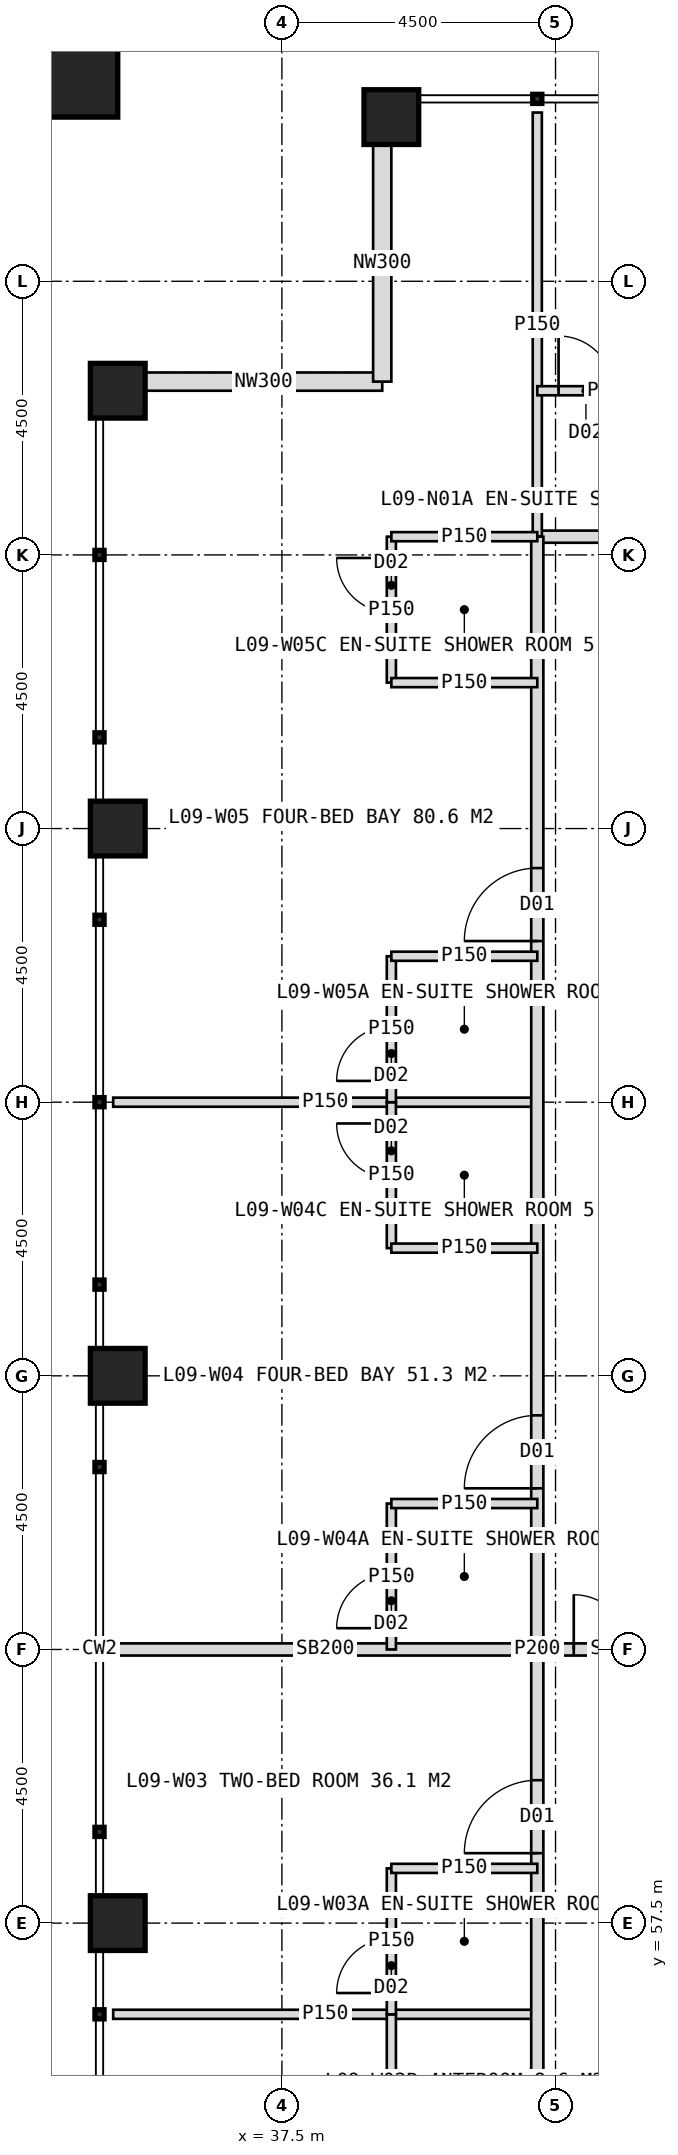
"""IFC4 building model, lengths in metres.
Left out: names, types, materials, properties, quantities, classifications, styles, units other than length and angle.
Written with IfcOpenShell. Run it as: python <this file> out.ifc"""

import sys

from ifc_helpers import new_model, si_unit, direction, frame, frame_2d, origin, origin_2d, place, context, subcontext, project, spatial, rectangle, hollow_rectangle, extrude, element, fill, save


model = new_model("IFC4")
c1 = context("Model", 3, precision=1e-05, world=origin(), true_north=direction((0.0, 1.0)))
c2 = subcontext(c1, "Body", "Model", "MODEL_VIEW")
j1 = project(units=[si_unit("LENGTHUNIT", "METRE"), si_unit("PLANEANGLEUNIT", "RADIAN")], contexts=[c1])
p1 = place(None, origin())
s1 = spatial("IfcSite", under=j1, at=p1, CompositionType="ELEMENT")
p2 = place(p1, origin())
s2 = spatial("IfcBuilding", under=s1, at=p2, CompositionType="ELEMENT")
p3 = place(p2, frame((0.0, 0.0, 43.0)))
s3 = spatial("IfcBuildingStorey", under=s2, at=p3, CompositionType="ELEMENT", Elevation=43.0)
for number, where, z_axis, x_axis in (
    (1, (39.3, 87.2, 0.0), (0.0, 0.0, 1.0), (1.0, 0.0, 0.0)),
    (2, (34.8, 57.5, 0.0), (0.0, 0.0, 1.0), (1.0, 0.0, 0.0)),
    (3, (34.8, 66.5, 0.0), (0.0, 0.0, 1.0), (1.0, 0.0, 0.0)),
    (4, (34.8, 75.5, 0.0), (0.0, 0.0, 1.0), (1.0, 0.0, 0.0)),
    (5, (34.8, 82.7, 0.0), (0.0, 0.0, 1.0), (1.0, 0.0, 0.0)),
):
    element("IfcColumn", number, at=place(p3, frame(where, z_axis=z_axis, x_axis=x_axis)), inside=s3, PredefinedType="COLUMN", context=c2, shape_type="SweptSolid", body=[
        extrude(hollow_rectangle(XDim=0.9, YDim=0.9, WallThickness=0.08, at=origin_2d()), origin(), (0.0, 0.0, 1.0), 4.0),
    ])
p4 = place(p3, frame((33.9, 88.1, 0.0), z_axis=(0.0, 0.0, 1.0), x_axis=(1.0, 0.0, 0.0)))
e6 = element("IfcColumn", 6, at=p4, inside=s3, PredefinedType="COLUMN", context=c2, shape_type="SweptSolid", body=[
    extrude(hollow_rectangle(XDim=1.8, YDim=1.8, WallThickness=0.1, at=origin_2d()), origin(), (0.0, 0.0, 1.0), 4.0),
])
for number, where, z_axis, x_axis in (
    (7, (35.25, 82.85, 0.0), (0.0, 0.0, 1.0), (1.0, 0.0, 0.0)),
    (8, (39.15, 82.85, 0.0), (0.0, 0.0, 1.0), (0.0, 1.0, 0.0)),
):
    element("IfcWall", number, at=place(p3, frame(where, z_axis=z_axis, x_axis=x_axis)), inside=s3, PredefinedType="ELEMENTEDWALL", context=c2, shape_type="SweptSolid", body=[
        extrude(rectangle(XDim=3.9, YDim=0.3, at=frame_2d((1.95, 0.0))), origin(), (0.0, 0.0, 1.0), 2.95),
    ])
p5 = place(p3, frame((41.7, 80.3, 0.0), z_axis=(0.0, 0.0, 1.0), x_axis=(1.0, 0.0, 0.0)))
e9 = element("IfcWall", 9, at=p5, inside=s3, PredefinedType="PARTITIONING", context=c2, shape_type="SweptSolid", body=[
    extrude(rectangle(XDim=36.6, YDim=0.2, at=frame_2d((18.3, 0.0))), origin(), (0.0, 0.0, 1.0), 3.75),
])
p6 = place(p5, frame((2.65, 0.0, 0.0)))
e10 = element("IfcOpeningElement", 10, at=p6, cuts=e9, PredefinedType="OPENING", context=c2, shape_type="SweptSolid", body=[
    extrude(rectangle(XDim=1.2, YDim=2.2, at=frame_2d((0.6, 1.1))), frame((0.0, 0.11, 0.0), z_axis=(0.0, -1.0, 0.0), x_axis=(1.0, 0.0, 0.0)), (0.0, 0.0, 1.0), 0.22),
])
p7 = place(p5, frame((11.95, 0.0, 0.0)))
e11 = element("IfcOpeningElement", 11, at=p7, cuts=e9, PredefinedType="OPENING", context=c2, shape_type="SweptSolid", body=[
    extrude(rectangle(XDim=1.2, YDim=2.2, at=frame_2d((0.6, 1.1))), frame((0.0, 0.11, 0.0), z_axis=(0.0, -1.0, 0.0), x_axis=(1.0, 0.0, 0.0)), (0.0, 0.0, 1.0), 0.22),
])
p8 = place(p5, frame((20.8, 0.0, 0.0)))
e12 = element("IfcOpeningElement", 12, at=p8, cuts=e9, PredefinedType="OPENING", context=c2, shape_type="SweptSolid", body=[
    extrude(rectangle(XDim=1.0, YDim=2.1, at=frame_2d((0.5, 1.05))), frame((0.0, 0.11, 0.0), z_axis=(0.0, -1.0, 0.0), x_axis=(1.0, 0.0, 0.0)), (0.0, 0.0, 1.0), 0.22),
])
p9 = place(p5, frame((26.95, 0.0, 0.0)))
e13 = element("IfcOpeningElement", 13, at=p9, cuts=e9, PredefinedType="OPENING", context=c2, shape_type="SweptSolid", body=[
    extrude(rectangle(XDim=1.2, YDim=2.2, at=frame_2d((0.6, 1.1))), frame((0.0, 0.11, 0.0), z_axis=(0.0, -1.0, 0.0), x_axis=(1.0, 0.0, 0.0)), (0.0, 0.0, 1.0), 0.22),
])
p10 = place(p3, frame((41.7, 80.3, 0.0), z_axis=(0.0, 0.0, 1.0), x_axis=(0.0, 1.0, 0.0)))
e14 = element("IfcWall", 14, at=p10, inside=s3, PredefinedType="PARTITIONING", context=c2, shape_type="SweptSolid", body=[
    extrude(rectangle(XDim=6.975, YDim=0.15, at=frame_2d((3.487, 0.0))), origin(), (0.0, 0.0, 1.0), 3.75),
])
p11 = place(p3, frame((41.7, 82.7, 0.0), z_axis=(0.0, 0.0, 1.0), x_axis=(1.0, 0.0, 0.0)))
e15 = element("IfcWall", 15, at=p11, inside=s3, PredefinedType="PARTITIONING", context=c2, shape_type="SweptSolid", body=[
    extrude(rectangle(XDim=2.4, YDim=0.15, at=frame_2d((1.2, 0.0))), origin(), (0.0, 0.0, 1.0), 2.95),
])
p12 = place(p11, frame((0.35, 0.0, 0.0)))
e16 = element("IfcOpeningElement", 16, at=p12, cuts=e15, PredefinedType="OPENING", context=c2, shape_type="SweptSolid", body=[
    extrude(rectangle(XDim=0.9, YDim=2.1, at=frame_2d((0.45, 1.05))), frame((0.0, 0.085, 0.0), z_axis=(0.0, -1.0, 0.0), x_axis=(1.0, 0.0, 0.0)), (0.0, 0.0, 1.0), 0.17),
])
p13 = place(p3, frame((41.7, 56.0, 0.0), z_axis=(0.0, 0.0, 1.0), x_axis=(-1.0, 0.0, 0.0)))
e17 = element("IfcWall", 17, at=p13, inside=s3, PredefinedType="PARTITIONING", context=c2, shape_type="SweptSolid", body=[
    extrude(rectangle(XDim=6.975, YDim=0.15, at=frame_2d((3.487, 0.0))), origin(), (0.0, 0.0, 1.0), 3.75),
])
p14 = place(p3, frame((41.7, 62.0, 0.0), z_axis=(0.0, 0.0, 1.0), x_axis=(-1.0, 0.0, 0.0)))
e18 = element("IfcWall", 18, at=p14, inside=s3, PredefinedType="SOLIDWALL", context=c2, shape_type="SweptSolid", body=[
    extrude(rectangle(XDim=6.975, YDim=0.2, at=frame_2d((3.487, 0.0))), origin(), (0.0, 0.0, 1.0), 2.75),
])
p15 = place(p3, frame((41.7, 71.0, 0.0), z_axis=(0.0, 0.0, 1.0), x_axis=(-1.0, 0.0, 0.0)))
e19 = element("IfcWall", 19, at=p15, inside=s3, PredefinedType="PARTITIONING", context=c2, shape_type="SweptSolid", body=[
    extrude(rectangle(XDim=6.975, YDim=0.15, at=frame_2d((3.487, 0.0))), origin(), (0.0, 0.0, 1.0), 3.75),
])
p16 = place(p3, frame((41.7, 43.7, 0.0), z_axis=(0.0, 0.0, 1.0), x_axis=(0.0, 1.0, 0.0)))
e20 = element("IfcWall", 20, at=p16, inside=s3, PredefinedType="PARTITIONING", context=c2, shape_type="SweptSolid", body=[
    extrude(rectangle(XDim=36.6, YDim=0.2, at=frame_2d((18.3, 0.0))), origin(), (0.0, 0.0, 1.0), 3.75),
])
p17 = place(p16, frame((2.65, 0.0, 0.0)))
e21 = element("IfcOpeningElement", 21, at=p17, cuts=e20, PredefinedType="OPENING", context=c2, shape_type="SweptSolid", body=[
    extrude(rectangle(XDim=1.2, YDim=2.2, at=frame_2d((0.6, 1.1))), frame((0.0, 0.11, 0.0), z_axis=(0.0, -1.0, 0.0), x_axis=(1.0, 0.0, 0.0)), (0.0, 0.0, 1.0), 0.22),
])
p18 = place(p16, frame((8.95, 0.0, 0.0)))
e22 = element("IfcOpeningElement", 22, at=p18, cuts=e20, PredefinedType="OPENING", context=c2, shape_type="SweptSolid", body=[
    extrude(rectangle(XDim=1.2, YDim=2.2, at=frame_2d((0.6, 1.1))), frame((0.0, 0.11, 0.0), z_axis=(0.0, -1.0, 0.0), x_axis=(1.0, 0.0, 0.0)), (0.0, 0.0, 1.0), 0.22),
])
p19 = place(p16, frame((14.95, 0.0, 0.0)))
e23 = element("IfcOpeningElement", 23, at=p19, cuts=e20, PredefinedType="OPENING", context=c2, shape_type="SweptSolid", body=[
    extrude(rectangle(XDim=1.2, YDim=2.2, at=frame_2d((0.6, 1.1))), frame((0.0, 0.11, 0.0), z_axis=(0.0, -1.0, 0.0), x_axis=(1.0, 0.0, 0.0)), (0.0, 0.0, 1.0), 0.22),
])
p20 = place(p16, frame((20.95, 0.0, 0.0)))
e24 = element("IfcOpeningElement", 24, at=p20, cuts=e20, PredefinedType="OPENING", context=c2, shape_type="SweptSolid", body=[
    extrude(rectangle(XDim=1.2, YDim=2.2, at=frame_2d((0.6, 1.1))), frame((0.0, 0.11, 0.0), z_axis=(0.0, -1.0, 0.0), x_axis=(1.0, 0.0, 0.0)), (0.0, 0.0, 1.0), 0.22),
])
p21 = place(p16, frame((29.95, 0.0, 0.0)))
e25 = element("IfcOpeningElement", 25, at=p21, cuts=e20, PredefinedType="OPENING", context=c2, shape_type="SweptSolid", body=[
    extrude(rectangle(XDim=1.2, YDim=2.2, at=frame_2d((0.6, 1.1))), frame((0.0, 0.11, 0.0), z_axis=(0.0, -1.0, 0.0), x_axis=(1.0, 0.0, 0.0)), (0.0, 0.0, 1.0), 0.22),
])
p22 = place(p3, frame((39.3, 52.4, 0.0), z_axis=(0.0, 0.0, 1.0), x_axis=(0.0, 1.0, 0.0)))
e26 = element("IfcWall", 26, at=p22, inside=s3, PredefinedType="PARTITIONING", context=c2, shape_type="SweptSolid", body=[
    extrude(rectangle(XDim=3.6, YDim=0.15, at=frame_2d((1.8, 0.0))), origin(), (0.0, 0.0, 1.0), 3.75),
])
p23 = place(p22, frame((0.25, 0.0, 0.0)))
e27 = element("IfcOpeningElement", 27, at=p23, cuts=e26, PredefinedType="OPENING", context=c2, shape_type="SweptSolid", body=[
    extrude(rectangle(XDim=1.2, YDim=2.2, at=frame_2d((0.6, 1.1))), frame((0.0, 0.085, 0.0), z_axis=(0.0, -1.0, 0.0), x_axis=(1.0, 0.0, 0.0)), (0.0, 0.0, 1.0), 0.17),
])
p24 = place(p3, frame((39.3, 56.0, 0.0), z_axis=(0.0, 0.0, 1.0), x_axis=(0.0, 1.0, 0.0)))
e28 = element("IfcWall", 28, at=p24, inside=s3, PredefinedType="PARTITIONING", context=c2, shape_type="SweptSolid", body=[
    extrude(rectangle(XDim=2.4, YDim=0.15, at=frame_2d((1.2, 0.0))), origin(), (0.0, 0.0, 1.0), 3.75),
])
p25 = place(p24, frame((0.35, 0.0, 0.0)))
e29 = element("IfcOpeningElement", 29, at=p25, cuts=e28, PredefinedType="OPENING", context=c2, shape_type="SweptSolid", body=[
    extrude(rectangle(XDim=0.9, YDim=2.1, at=frame_2d((0.45, 1.05))), frame((0.0, 0.085, 0.0), z_axis=(0.0, -1.0, 0.0), x_axis=(1.0, 0.0, 0.0)), (0.0, 0.0, 1.0), 0.17),
])
p26 = place(p3, frame((41.7, 58.4, 0.0), z_axis=(0.0, 0.0, 1.0), x_axis=(-1.0, 0.0, 0.0)))
e30 = element("IfcWall", 30, at=p26, inside=s3, PredefinedType="PARTITIONING", context=c2, shape_type="SweptSolid", body=[
    extrude(rectangle(XDim=2.4, YDim=0.15, at=frame_2d((1.2, 0.0))), origin(), (0.0, 0.0, 1.0), 3.75),
])
p27 = place(p3, frame((39.3, 62.0, 0.0), z_axis=(0.0, 0.0, 1.0), x_axis=(0.0, 1.0, 0.0)))
e31 = element("IfcWall", 31, at=p27, inside=s3, PredefinedType="PARTITIONING", context=c2, shape_type="SweptSolid", body=[
    extrude(rectangle(XDim=2.4, YDim=0.15, at=frame_2d((1.2, 0.0))), origin(), (0.0, 0.0, 1.0), 3.75),
])
p28 = place(p27, frame((0.35, 0.0, 0.0)))
e32 = element("IfcOpeningElement", 32, at=p28, cuts=e31, PredefinedType="OPENING", context=c2, shape_type="SweptSolid", body=[
    extrude(rectangle(XDim=0.9, YDim=2.1, at=frame_2d((0.45, 1.05))), frame((0.0, 0.085, 0.0), z_axis=(0.0, -1.0, 0.0), x_axis=(1.0, 0.0, 0.0)), (0.0, 0.0, 1.0), 0.17),
])
p29 = place(p3, frame((41.7, 64.4, 0.0), z_axis=(0.0, 0.0, 1.0), x_axis=(-1.0, 0.0, 0.0)))
e33 = element("IfcWall", 33, at=p29, inside=s3, PredefinedType="PARTITIONING", context=c2, shape_type="SweptSolid", body=[
    extrude(rectangle(XDim=2.4, YDim=0.15, at=frame_2d((1.2, 0.0))), origin(), (0.0, 0.0, 1.0), 3.75),
])
p30 = place(p3, frame((39.3, 68.6, 0.0), z_axis=(0.0, 0.0, 1.0), x_axis=(0.0, 1.0, 0.0)))
e34 = element("IfcWall", 34, at=p30, inside=s3, PredefinedType="PARTITIONING", context=c2, shape_type="SweptSolid", body=[
    extrude(rectangle(XDim=2.4, YDim=0.15, at=frame_2d((1.2, 0.0))), origin(), (0.0, 0.0, 1.0), 3.75),
])
p31 = place(p30, frame((1.15, 0.0, 0.0)))
e35 = element("IfcOpeningElement", 35, at=p31, cuts=e34, PredefinedType="OPENING", context=c2, shape_type="SweptSolid", body=[
    extrude(rectangle(XDim=0.9, YDim=2.1, at=frame_2d((0.45, 1.05))), frame((0.0, 0.085, 0.0), z_axis=(0.0, -1.0, 0.0), x_axis=(1.0, 0.0, 0.0)), (0.0, 0.0, 1.0), 0.17),
])
p32 = place(p3, frame((41.7, 68.6, 0.0), z_axis=(0.0, 0.0, 1.0), x_axis=(-1.0, 0.0, 0.0)))
e36 = element("IfcWall", 36, at=p32, inside=s3, PredefinedType="PARTITIONING", context=c2, shape_type="SweptSolid", body=[
    extrude(rectangle(XDim=2.4, YDim=0.15, at=frame_2d((1.2, 0.0))), origin(), (0.0, 0.0, 1.0), 3.75),
])
p33 = place(p3, frame((39.3, 71.0, 0.0), z_axis=(0.0, 0.0, 1.0), x_axis=(0.0, 1.0, 0.0)))
e37 = element("IfcWall", 37, at=p33, inside=s3, PredefinedType="PARTITIONING", context=c2, shape_type="SweptSolid", body=[
    extrude(rectangle(XDim=2.4, YDim=0.15, at=frame_2d((1.2, 0.0))), origin(), (0.0, 0.0, 1.0), 3.75),
])
p34 = place(p33, frame((0.35, 0.0, 0.0)))
e38 = element("IfcOpeningElement", 38, at=p34, cuts=e37, PredefinedType="OPENING", context=c2, shape_type="SweptSolid", body=[
    extrude(rectangle(XDim=0.9, YDim=2.1, at=frame_2d((0.45, 1.05))), frame((0.0, 0.085, 0.0), z_axis=(0.0, -1.0, 0.0), x_axis=(1.0, 0.0, 0.0)), (0.0, 0.0, 1.0), 0.17),
])
p35 = place(p3, frame((41.7, 73.4, 0.0), z_axis=(0.0, 0.0, 1.0), x_axis=(-1.0, 0.0, 0.0)))
e39 = element("IfcWall", 39, at=p35, inside=s3, PredefinedType="PARTITIONING", context=c2, shape_type="SweptSolid", body=[
    extrude(rectangle(XDim=2.4, YDim=0.15, at=frame_2d((1.2, 0.0))), origin(), (0.0, 0.0, 1.0), 3.75),
])
p36 = place(p3, frame((39.3, 77.9, 0.0), z_axis=(0.0, 0.0, 1.0), x_axis=(0.0, 1.0, 0.0)))
e40 = element("IfcWall", 40, at=p36, inside=s3, PredefinedType="PARTITIONING", context=c2, shape_type="SweptSolid", body=[
    extrude(rectangle(XDim=2.4, YDim=0.15, at=frame_2d((1.2, 0.0))), origin(), (0.0, 0.0, 1.0), 2.95),
])
p37 = place(p36, frame((1.15, 0.0, 0.0)))
e41 = element("IfcOpeningElement", 41, at=p37, cuts=e40, PredefinedType="OPENING", context=c2, shape_type="SweptSolid", body=[
    extrude(rectangle(XDim=0.9, YDim=2.1, at=frame_2d((0.45, 1.05))), frame((0.0, 0.085, 0.0), z_axis=(0.0, -1.0, 0.0), x_axis=(1.0, 0.0, 0.0)), (0.0, 0.0, 1.0), 0.17),
])
for number, where, z_axis, x_axis in (
    (42, (41.7, 77.9, 0.0), (0.0, 0.0, 1.0), (-1.0, 0.0, 0.0)),
    (43, (41.7, 80.3, 0.0), (0.0, 0.0, 1.0), (-1.0, 0.0, 0.0)),
):
    element("IfcWall", number, at=place(p3, frame(where, z_axis=z_axis, x_axis=x_axis)), inside=s3, PredefinedType="PARTITIONING", context=c2, shape_type="SweptSolid", body=[
        extrude(rectangle(XDim=2.4, YDim=0.15, at=frame_2d((1.2, 0.0))), origin(), (0.0, 0.0, 1.0), 3.75),
    ])
p38 = place(p3, frame((44.4, 62.0, 0.0), z_axis=(0.0, 0.0, 1.0), x_axis=(-1.0, 0.0, 0.0)))
e44 = element("IfcWall", 44, at=p38, inside=s3, PredefinedType="SOLIDWALL", context=c2, shape_type="SweptSolid", body=[
    extrude(rectangle(XDim=2.7, YDim=0.2, at=frame_2d((1.35, 0.0))), origin(), (0.0, 0.0, 1.0), 2.75),
])
p39 = place(p38, frame((0.3, 0.0, 0.0)))
e45 = element("IfcOpeningElement", 45, at=p39, cuts=e44, PredefinedType="OPENING", context=c2, shape_type="SweptSolid", body=[
    extrude(rectangle(XDim=1.8, YDim=2.2, at=frame_2d((0.9, 1.1))), frame((0.0, 0.11, 0.0), z_axis=(0.0, -1.0, 0.0), x_axis=(1.0, 0.0, 0.0)), (0.0, 0.0, 1.0), 0.22),
])
p40 = place(p12, origin())
e46 = element("IfcDoor", 46, at=p40, inside=s3, OperationType="SINGLE_SWING_LEFT", PredefinedType="DOOR", context=c2, shape_type="SweptSolid", body=[
    extrude(rectangle(XDim=0.9, YDim=2.1, at=frame_2d((0.45, 1.05))), frame((0.0, 0.025, 0.0), z_axis=(0.0, -1.0, 0.0), x_axis=(1.0, 0.0, 0.0)), (0.0, 0.0, 1.0), 0.05),
])
fill(e16, e46)
p41 = place(p19, origin())
e47 = element("IfcDoor", 47, at=p41, inside=s3, OperationType="SINGLE_SWING_LEFT", PredefinedType="DOOR", context=c2, shape_type="SweptSolid", body=[
    extrude(rectangle(XDim=1.2, YDim=2.2, at=frame_2d((0.6, 1.1))), frame((0.0, 0.025, 0.0), z_axis=(0.0, -1.0, 0.0), x_axis=(1.0, 0.0, 0.0)), (0.0, 0.0, 1.0), 0.05),
])
fill(e23, e47)
p42 = place(p25, origin())
e48 = element("IfcDoor", 48, at=p42, inside=s3, OperationType="SINGLE_SWING_LEFT", PredefinedType="DOOR", context=c2, shape_type="SweptSolid", body=[
    extrude(rectangle(XDim=0.9, YDim=2.1, at=frame_2d((0.45, 1.05))), frame((0.0, 0.025, 0.0), z_axis=(0.0, -1.0, 0.0), x_axis=(1.0, 0.0, 0.0)), (0.0, 0.0, 1.0), 0.05),
])
fill(e29, e48)
p43 = place(p20, origin())
e49 = element("IfcDoor", 49, at=p43, inside=s3, OperationType="SINGLE_SWING_LEFT", PredefinedType="DOOR", context=c2, shape_type="SweptSolid", body=[
    extrude(rectangle(XDim=1.2, YDim=2.2, at=frame_2d((0.6, 1.1))), frame((0.0, 0.025, 0.0), z_axis=(0.0, -1.0, 0.0), x_axis=(1.0, 0.0, 0.0)), (0.0, 0.0, 1.0), 0.05),
])
fill(e24, e49)
p44 = place(p28, origin())
e50 = element("IfcDoor", 50, at=p44, inside=s3, OperationType="SINGLE_SWING_LEFT", PredefinedType="DOOR", context=c2, shape_type="SweptSolid", body=[
    extrude(rectangle(XDim=0.9, YDim=2.1, at=frame_2d((0.45, 1.05))), frame((0.0, 0.025, 0.0), z_axis=(0.0, -1.0, 0.0), x_axis=(1.0, 0.0, 0.0)), (0.0, 0.0, 1.0), 0.05),
])
fill(e32, e50)
p45 = place(p31, origin())
e51 = element("IfcDoor", 51, at=p45, inside=s3, OperationType="SINGLE_SWING_RIGHT", PredefinedType="DOOR", context=c2, shape_type="SweptSolid", body=[
    extrude(rectangle(XDim=0.9, YDim=2.1, at=frame_2d((0.45, 1.05))), frame((0.0, 0.025, 0.0), z_axis=(0.0, -1.0, 0.0), x_axis=(1.0, 0.0, 0.0)), (0.0, 0.0, 1.0), 0.05),
])
fill(e35, e51)
p46 = place(p21, origin())
e52 = element("IfcDoor", 52, at=p46, inside=s3, OperationType="SINGLE_SWING_LEFT", PredefinedType="DOOR", context=c2, shape_type="SweptSolid", body=[
    extrude(rectangle(XDim=1.2, YDim=2.2, at=frame_2d((0.6, 1.1))), frame((0.0, 0.025, 0.0), z_axis=(0.0, -1.0, 0.0), x_axis=(1.0, 0.0, 0.0)), (0.0, 0.0, 1.0), 0.05),
])
fill(e25, e52)
p47 = place(p34, origin())
e53 = element("IfcDoor", 53, at=p47, inside=s3, OperationType="SINGLE_SWING_LEFT", PredefinedType="DOOR", context=c2, shape_type="SweptSolid", body=[
    extrude(rectangle(XDim=0.9, YDim=2.1, at=frame_2d((0.45, 1.05))), frame((0.0, 0.025, 0.0), z_axis=(0.0, -1.0, 0.0), x_axis=(1.0, 0.0, 0.0)), (0.0, 0.0, 1.0), 0.05),
])
fill(e38, e53)
p48 = place(p37, origin())
e54 = element("IfcDoor", 54, at=p48, inside=s3, OperationType="SINGLE_SWING_RIGHT", PredefinedType="DOOR", context=c2, shape_type="SweptSolid", body=[
    extrude(rectangle(XDim=0.9, YDim=2.1, at=frame_2d((0.45, 1.05))), frame((0.0, 0.025, 0.0), z_axis=(0.0, -1.0, 0.0), x_axis=(1.0, 0.0, 0.0)), (0.0, 0.0, 1.0), 0.05),
])
fill(e41, e54)
p49 = place(p39, origin())
e55 = element("IfcDoor", 55, at=p49, inside=s3, OperationType="DOUBLE_DOOR_DOUBLE_SWING", PredefinedType="DOOR", context=c2, shape_type="SweptSolid", body=[
    extrude(rectangle(XDim=1.8, YDim=2.2, at=frame_2d((0.9, 1.1))), frame((0.0, 0.025, 0.0), z_axis=(0.0, -1.0, 0.0), x_axis=(1.0, 0.0, 0.0)), (0.0, 0.0, 1.0), 0.05),
])
fill(e45, e55)
save(model, sys.argv[1])
